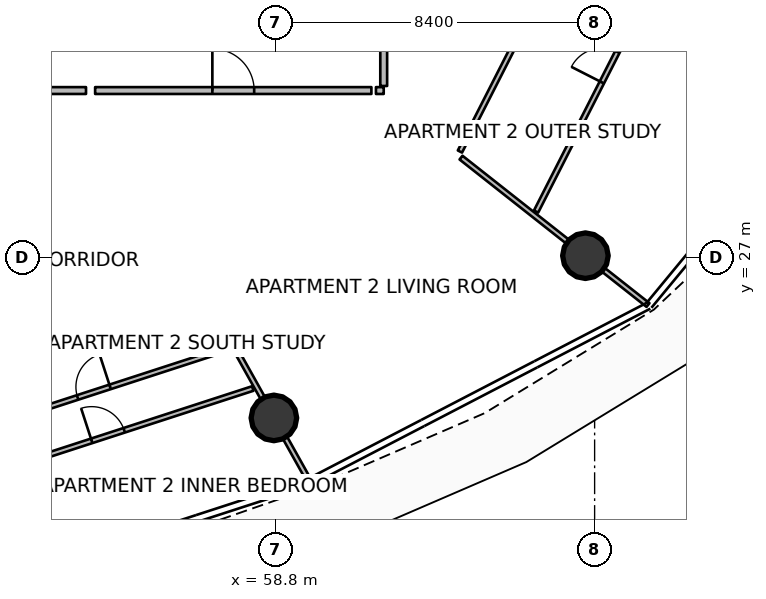
"""IFC4 building model, lengths in metres.
Left out: names, types, materials, properties, quantities, classifications, styles, units other than length and angle.
Written with IfcOpenShell. Run it as: python <this file> out.ifc"""

import sys

from ifc_helpers import new_model, si_unit, direction, frame, frame_2d, origin, origin_2d, place, context, subcontext, project, spatial, rectangle, circle, extrude, element, fill, save


model = new_model("IFC4")
c1 = context("Model", 3, precision=1e-05, world=origin(), true_north=direction((0.0, 1.0)))
c2 = subcontext(c1, "Body", "Model", "MODEL_VIEW")
j1 = project(units=[si_unit("LENGTHUNIT", "METRE"), si_unit("PLANEANGLEUNIT", "RADIAN")], contexts=[c1])
p1 = place(None, origin())
s1 = spatial("IfcSite", under=j1, at=p1, CompositionType="ELEMENT")
p2 = place(p1, origin())
s2 = spatial("IfcBuilding", under=s1, at=p2, CompositionType="ELEMENT")
p3 = place(p2, frame((0.0, 0.0, 75.15)))
s3 = spatial("IfcBuildingStorey", under=s2, at=p3, CompositionType="ELEMENT", Elevation=75.15)
for number, where, z_axis, x_axis in (
    (1, (58.76, 22.786, 0.0), (0.0, 0.0, 1.0), (1.0, 0.0, 0.0)),
    (2, (66.958, 27.055, 0.0), (0.0, 0.0, 1.0), (1.0, 0.0, 0.0)),
):
    element("IfcColumn", number, at=place(p3, frame(where, z_axis=z_axis, x_axis=x_axis)), inside=s3, PredefinedType="COLUMN", context=c2, shape_type="SweptSolid", body=[
        extrude(circle(Radius=0.6, at=origin_2d()), origin(), (0.0, 0.0, 1.0), 3.5),
    ])
p4 = place(p3, frame((54.056, 31.4, 0.0), z_axis=(0.0, 0.0, 1.0), x_axis=(1.0, 0.0, 0.0)))
e3 = element("IfcWall", 3, at=p4, inside=s3, PredefinedType="PARTITIONING", context=c2, shape_type="SweptSolid", body=[
    extrude(rectangle(XDim=7.27, YDim=0.18, at=frame_2d((3.635, 0.0))), origin(), (0.0, 0.0, 1.0), 2.94),
])
p5 = place(p4, frame((3.085, 0.0, 0.0)))
e4 = element("IfcOpeningElement", 4, at=p5, cuts=e3, PredefinedType="OPENING", context=c2, shape_type="SweptSolid", body=[
    extrude(rectangle(XDim=1.1, YDim=2.1, at=frame_2d((0.55, 1.05))), frame((0.0, 0.1, 0.0), z_axis=(0.0, -1.0, 0.0), x_axis=(1.0, 0.0, 0.0)), (0.0, 0.0, 1.0), 0.2),
])
p6 = place(p3, frame((49.375, 31.4, 0.0), z_axis=(0.0, 0.0, 1.0), x_axis=(1.0, 0.0, 0.0)))
e5 = element("IfcWall", 5, at=p6, inside=s3, PredefinedType="PARTITIONING", context=c2, shape_type="SweptSolid", body=[
    extrude(rectangle(XDim=4.442, YDim=0.18, at=frame_2d((2.221, 0.0))), origin(), (0.0, 0.0, 1.0), 2.94),
])
p7 = place(p3, frame((57.759, 24.574, 0.0), z_axis=(0.0, 0.0, 1.0), x_axis=(0.488599605157, -0.872508123653, 0.0)))
e6 = element("IfcWall", 6, at=p7, inside=s3, PredefinedType="PARTITIONING", context=c2, shape_type="SweptSolid", body=[
    extrude(rectangle(XDim=3.95, YDim=0.125, at=frame_2d((1.975, 0.0))), origin(), (0.0, 0.0, 1.0), 2.94),
])
p8 = place(p3, frame((50.44, 22.3, 0.0), z_axis=(0.0, 0.0, 1.0), x_axis=(0.951063594717, 0.308995208383, 0.0)))
e7 = element("IfcWall", 7, at=p8, inside=s3, PredefinedType="PARTITIONING", context=c2, shape_type="SweptSolid", body=[
    extrude(rectangle(XDim=7.534, YDim=0.125, at=frame_2d((3.767, 0.0))), origin(), (0.0, 0.0, 1.0), 2.94),
])
p9 = place(p8, frame((3.317, 0.0, 0.0)))
e8 = element("IfcOpeningElement", 8, at=p9, cuts=e7, PredefinedType="OPENING", context=c2, shape_type="SweptSolid", body=[
    extrude(rectangle(XDim=0.9, YDim=2.08, at=frame_2d((0.45, 1.04))), frame((0.0, 0.073, 0.0), z_axis=(0.0, -1.0, 0.0), x_axis=(1.0, 0.0, 0.0)), (0.0, 0.0, 1.0), 0.145),
])
p10 = place(p3, frame((50.584, 21.084, 0.0), z_axis=(0.0, 0.0, 1.0), x_axis=(0.951057357111, 0.309014406598, 0.0)))
e9 = element("IfcWall", 9, at=p10, inside=s3, PredefinedType="PARTITIONING", context=c2, shape_type="SweptSolid", body=[
    extrude(rectangle(XDim=8.011, YDim=0.125, at=frame_2d((4.006, 0.0))), origin(), (0.0, 0.0, 1.0), 2.94),
])
p11 = place(p10, frame((3.556, 0.0, 0.0)))
e10 = element("IfcOpeningElement", 10, at=p11, cuts=e9, PredefinedType="OPENING", context=c2, shape_type="SweptSolid", body=[
    extrude(rectangle(XDim=0.9, YDim=2.08, at=frame_2d((0.45, 1.04))), frame((0.0, 0.073, 0.0), z_axis=(0.0, -1.0, 0.0), x_axis=(1.0, 0.0, 0.0)), (0.0, 0.0, 1.0), 0.145),
])
p12 = place(p3, frame((61.446, 31.4, 0.0), z_axis=(0.0, 0.0, 1.0), x_axis=(1.0, 0.0, 0.0)))
e11 = element("IfcWall", 11, at=p12, inside=s3, PredefinedType="PARTITIONING", context=c2, shape_type="SweptSolid", body=[
    extrude(rectangle(XDim=0.204, YDim=0.18, at=frame_2d((0.102, 0.0))), origin(), (0.0, 0.0, 1.0), 2.94),
])
p13 = place(p3, frame((61.65, 31.52, 0.0), z_axis=(0.0, 0.0, 1.0), x_axis=(0.0, 1.0, 0.0)))
e12 = element("IfcWall", 12, at=p13, inside=s3, PredefinedType="PARTITIONING", context=c2, shape_type="SweptSolid", body=[
    extrude(rectangle(XDim=6.51, YDim=0.18, at=frame_2d((3.255, 0.0))), origin(), (0.0, 0.0, 1.0), 2.94),
])
p14 = place(p3, frame((63.684, 29.635, 0.0), z_axis=(0.0, 0.0, 1.0), x_axis=(0.785296487737, -0.619119880434, 0.0)))
e13 = element("IfcWall", 13, at=p14, inside=s3, PredefinedType="PARTITIONING", context=c2, shape_type="SweptSolid", body=[
    extrude(rectangle(XDim=6.266, YDim=0.125, at=frame_2d((3.133, 0.0))), origin(), (0.0, 0.0, 1.0), 2.94),
])
p15 = place(p3, frame((63.656, 29.795, 0.0), z_axis=(0.0, 0.0, 1.0), x_axis=(0.453993260123, 0.891005117697, 0.0)))
e14 = element("IfcWall", 14, at=p15, inside=s3, PredefinedType="PARTITIONING", context=c2, shape_type="SweptSolid", body=[
    extrude(rectangle(XDim=7.533, YDim=0.125, at=frame_2d((3.767, 0.0))), origin(), (0.0, 0.0, 1.0), 2.94),
])
p16 = place(p15, frame((3.317, 0.0, 0.0)))
e15 = element("IfcOpeningElement", 15, at=p16, cuts=e14, PredefinedType="OPENING", context=c2, shape_type="SweptSolid", body=[
    extrude(rectangle(XDim=0.9, YDim=2.08, at=frame_2d((0.45, 1.04))), frame((0.0, 0.073, 0.0), z_axis=(0.0, -1.0, 0.0), x_axis=(1.0, 0.0, 0.0)), (0.0, 0.0, 1.0), 0.145),
])
p17 = place(p3, frame((65.659, 28.216, 0.0), z_axis=(0.0, 0.0, 1.0), x_axis=(0.453990530045, 0.891006508747, 0.0)))
e16 = element("IfcWall", 16, at=p17, inside=s3, PredefinedType="PARTITIONING", context=c2, shape_type="SweptSolid", body=[
    extrude(rectangle(XDim=8.529, YDim=0.125, at=frame_2d((4.265, 0.0))), origin(), (0.0, 0.0, 1.0), 2.94),
])
p18 = place(p17, frame((3.814, 0.0, 0.0)))
e17 = element("IfcOpeningElement", 17, at=p18, cuts=e16, PredefinedType="OPENING", context=c2, shape_type="SweptSolid", body=[
    extrude(rectangle(XDim=0.9, YDim=2.08, at=frame_2d((0.45, 1.04))), frame((0.0, 0.073, 0.0), z_axis=(0.0, -1.0, 0.0), x_axis=(1.0, 0.0, 0.0)), (0.0, 0.0, 1.0), 0.145),
])
p19 = place(p5, origin())
e18 = element("IfcDoor", 18, at=p19, inside=s3, OperationType="SINGLE_SWING_LEFT", PredefinedType="DOOR", context=c2, shape_type="SweptSolid", body=[
    extrude(rectangle(XDim=1.1, YDim=2.1, at=frame_2d((0.55, 1.05))), frame((0.0, 0.025, 0.0), z_axis=(0.0, -1.0, 0.0), x_axis=(1.0, 0.0, 0.0)), (0.0, 0.0, 1.0), 0.05),
])
fill(e4, e18)
p20 = place(p9, origin())
e19 = element("IfcDoor", 19, at=p20, inside=s3, OperationType="SINGLE_SWING_RIGHT", PredefinedType="DOOR", context=c2, shape_type="SweptSolid", body=[
    extrude(rectangle(XDim=0.9, YDim=2.08, at=frame_2d((0.45, 1.04))), frame((0.0, 0.025, 0.0), z_axis=(0.0, -1.0, 0.0), x_axis=(1.0, 0.0, 0.0)), (0.0, 0.0, 1.0), 0.05),
])
fill(e8, e19)
p21 = place(p11, origin())
e20 = element("IfcDoor", 20, at=p21, inside=s3, OperationType="SINGLE_SWING_LEFT", PredefinedType="DOOR", context=c2, shape_type="SweptSolid", body=[
    extrude(rectangle(XDim=0.9, YDim=2.08, at=frame_2d((0.45, 1.04))), frame((0.0, 0.025, 0.0), z_axis=(0.0, -1.0, 0.0), x_axis=(1.0, 0.0, 0.0)), (0.0, 0.0, 1.0), 0.05),
])
fill(e10, e20)
p22 = place(p18, origin())
e21 = element("IfcDoor", 21, at=p22, inside=s3, OperationType="SINGLE_SWING_LEFT", PredefinedType="DOOR", context=c2, shape_type="SweptSolid", body=[
    extrude(rectangle(XDim=0.9, YDim=2.08, at=frame_2d((0.45, 1.04))), frame((0.0, 0.025, 0.0), z_axis=(0.0, -1.0, 0.0), x_axis=(1.0, 0.0, 0.0)), (0.0, 0.0, 1.0), 0.05),
])
fill(e17, e21)
save(model, sys.argv[1])
